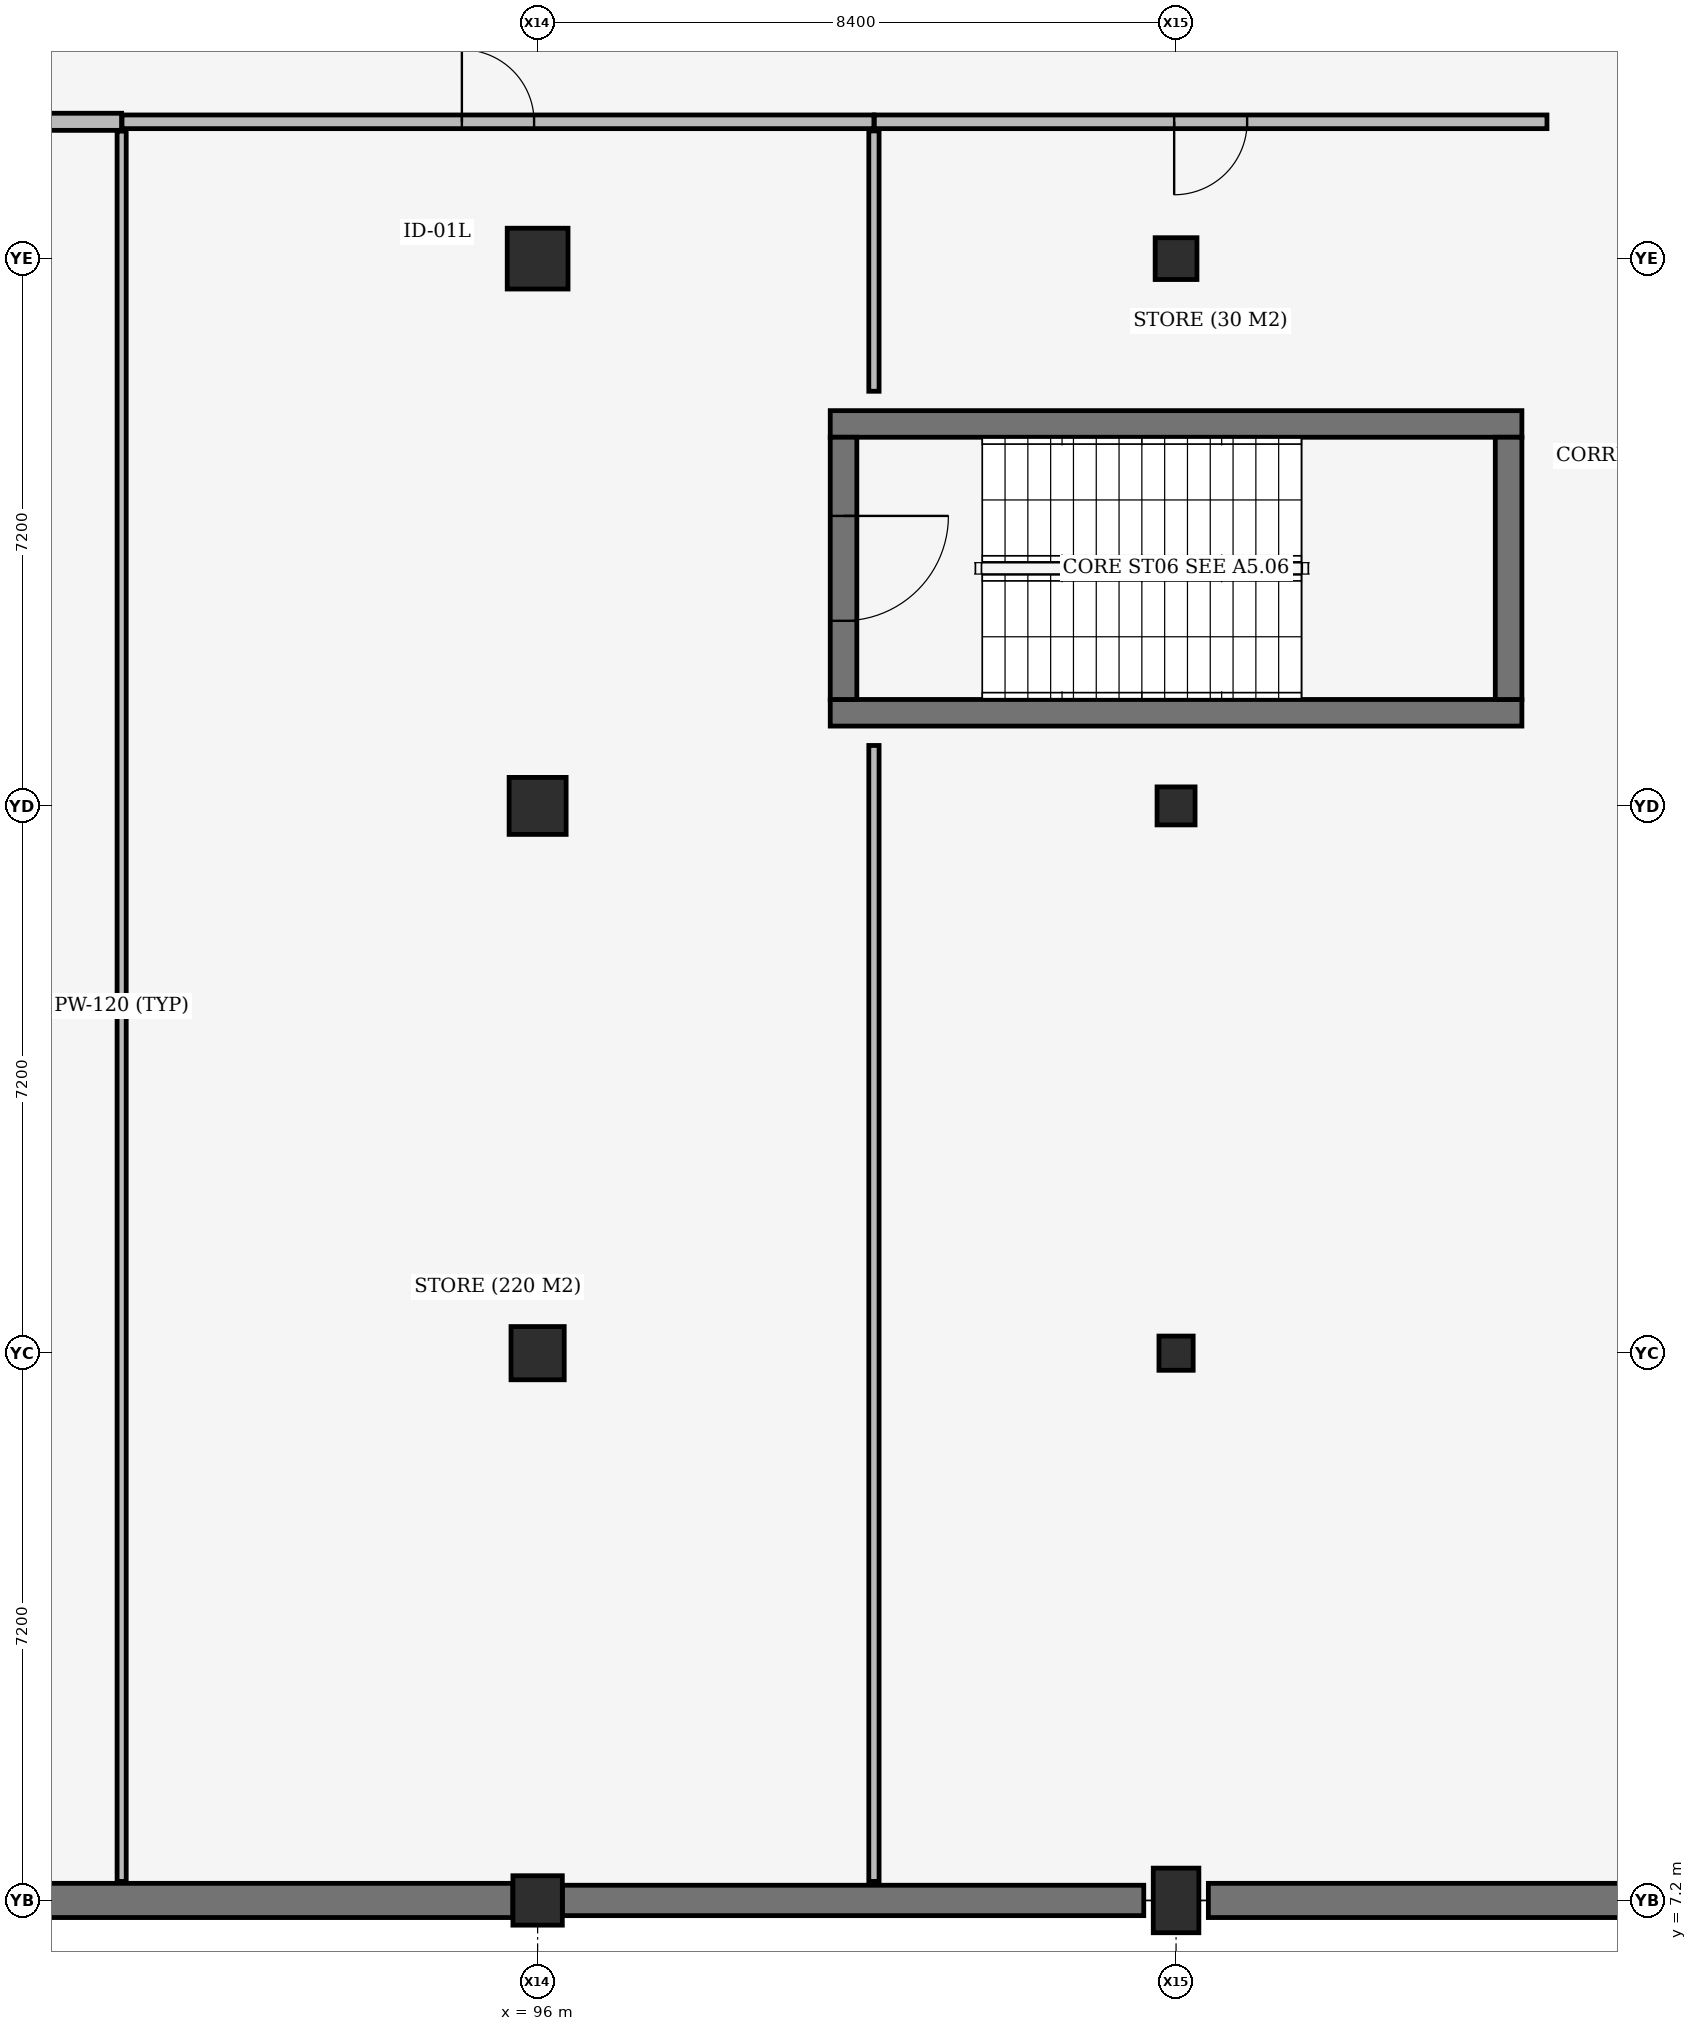
"""IFC4 building model, lengths in metres.
Left out: names, types, materials, properties, quantities, classifications, styles, units other than length and angle.
Written with IfcOpenShell. Run it as: python <this file> out.ifc"""

import sys

from ifc_helpers import new_model, si_unit, direction, frame, frame_2d, origin, origin_2d, place, context, subcontext, project, spatial, rectangle, extrude, element, fill, save


model = new_model("IFC4")
c1 = context("Model", 3, precision=1e-05, world=origin(), true_north=direction((0.0, 1.0)))
c2 = subcontext(c1, "Body", "Model", "MODEL_VIEW")
j1 = project(units=[si_unit("LENGTHUNIT", "METRE"), si_unit("PLANEANGLEUNIT", "RADIAN")], contexts=[c1])
p1 = place(None, origin())
s1 = spatial("IfcSite", under=j1, at=p1, CompositionType="ELEMENT")
p2 = place(p1, origin())
s2 = spatial("IfcBuilding", under=s1, at=p2, CompositionType="ELEMENT")
p3 = place(p2, frame((0.0, 0.0, -4.5)))
s3 = spatial("IfcBuildingStorey", under=s2, at=p3, CompositionType="ELEMENT", Elevation=-4.5)
p4 = place(p3, frame((96.0, 7.2, -0.42), z_axis=(0.0, 0.0, 1.0), x_axis=(1.0, 0.0, 0.0)))
e1 = element("IfcColumn", 1, at=p4, inside=s3, PredefinedType="COLUMN", context=c2, shape_type="SweptSolid", body=[
    extrude(rectangle(XDim=0.65, YDim=0.65, at=origin_2d()), origin(), (0.0, 0.0, 1.0), 4.6),
])
p5 = place(p3, frame((96.0, 14.4, -0.42), z_axis=(0.0, 0.0, 1.0), x_axis=(1.0, 0.0, 0.0)))
e2 = element("IfcColumn", 2, at=p5, inside=s3, PredefinedType="COLUMN", context=c2, shape_type="SweptSolid", body=[
    extrude(rectangle(XDim=0.7, YDim=0.7, at=origin_2d()), origin(), (0.0, 0.0, 1.0), 4.6),
])
p6 = place(p3, frame((96.0, 21.6, -0.42), z_axis=(0.0, 0.0, 1.0), x_axis=(1.0, 0.0, 0.0)))
e3 = element("IfcColumn", 3, at=p6, inside=s3, PredefinedType="COLUMN", context=c2, shape_type="SweptSolid", body=[
    extrude(rectangle(XDim=0.75, YDim=0.75, at=origin_2d()), origin(), (0.0, 0.0, 1.0), 4.6),
])
p7 = place(p3, frame((96.0, 28.8, -0.42), z_axis=(0.0, 0.0, 1.0), x_axis=(1.0, 0.0, 0.0)))
e4 = element("IfcColumn", 4, at=p7, inside=s3, PredefinedType="COLUMN", context=c2, shape_type="SweptSolid", body=[
    extrude(rectangle(XDim=0.8, YDim=0.8, at=origin_2d()), origin(), (0.0, 0.0, 1.0), 4.6),
])
p8 = place(p3, frame((104.4, 7.2, -0.42), z_axis=(0.0, 0.0, 1.0), x_axis=(1.0, 0.0, 0.0)))
e5 = element("IfcColumn", 5, at=p8, inside=s3, PredefinedType="COLUMN", context=c2, shape_type="SweptSolid", body=[
    extrude(rectangle(XDim=0.6, YDim=0.85, at=origin_2d()), origin(), (0.0, 0.0, 1.0), 4.6),
])
p9 = place(p3, frame((104.4, 14.4, -0.42), z_axis=(0.0, 0.0, 1.0), x_axis=(1.0, 0.0, 0.0)))
e6 = element("IfcColumn", 6, at=p9, inside=s3, PredefinedType="COLUMN", context=c2, shape_type="SweptSolid", body=[
    extrude(rectangle(XDim=0.45, YDim=0.45, at=origin_2d()), origin(), (0.0, 0.0, 1.0), 4.6),
])
p10 = place(p3, frame((104.4, 21.6, -0.42), z_axis=(0.0, 0.0, 1.0), x_axis=(1.0, 0.0, 0.0)))
e7 = element("IfcColumn", 7, at=p10, inside=s3, PredefinedType="COLUMN", context=c2, shape_type="SweptSolid", body=[
    extrude(rectangle(XDim=0.5, YDim=0.5, at=origin_2d()), origin(), (0.0, 0.0, 1.0), 4.6),
])
p11 = place(p3, frame((104.4, 28.8, -0.42), z_axis=(0.0, 0.0, 1.0), x_axis=(1.0, 0.0, 0.0)))
e8 = element("IfcColumn", 8, at=p11, inside=s3, PredefinedType="COLUMN", context=c2, shape_type="SweptSolid", body=[
    extrude(rectangle(XDim=0.55, YDim=0.55, at=origin_2d()), origin(), (0.0, 0.0, 1.0), 4.6),
])
for number, where, z_axis, x_axis in (
    (9, (99.85, 22.825, 0.0), (0.0, 0.0, 1.0), (1.0, 0.0, 0.0)),
    (10, (108.95, 26.625, 0.0), (0.0, 0.0, 1.0), (-1.0, 0.0, 0.0)),
):
    element("IfcWall", number, at=place(p3, frame(where, z_axis=z_axis, x_axis=x_axis)), inside=s3, PredefinedType="SHEAR", context=c2, shape_type="SweptSolid", body=[
        extrude(rectangle(XDim=9.1, YDim=0.35, at=frame_2d((4.55, 0.0))), origin(), (0.0, 0.0, 1.0), 4.18),
    ])
p12 = place(p3, frame((108.775, 23.0, 0.0), z_axis=(0.0, 0.0, 1.0), x_axis=(0.0, 1.0, 0.0)))
e11 = element("IfcWall", 11, at=p12, inside=s3, PredefinedType="SHEAR", context=c2, shape_type="SweptSolid", body=[
    extrude(rectangle(XDim=3.45, YDim=0.35, at=frame_2d((1.725, 0.0))), origin(), (0.0, 0.0, 1.0), 4.18),
])
p13 = place(p3, frame((88.025, 7.2, 0.0), z_axis=(0.0, 0.0, 1.0), x_axis=(1.0, 0.0, 0.0)))
e12 = element("IfcWall", 12, at=p13, inside=s3, PredefinedType="USERDEFINED", context=c2, shape_type="SweptSolid", body=[
    extrude(rectangle(XDim=7.65, YDim=0.45, at=frame_2d((3.825, 0.0))), origin(), (0.0, 0.0, 1.0), 4.18),
])
p14 = place(p3, frame((96.325, 7.2, 0.0), z_axis=(0.0, 0.0, 1.0), x_axis=(1.0, 0.0, 0.0)))
e13 = element("IfcWall", 13, at=p14, inside=s3, PredefinedType="USERDEFINED", context=c2, shape_type="SweptSolid", body=[
    extrude(rectangle(XDim=7.65, YDim=0.4, at=frame_2d((3.825, 0.0))), origin(), (0.0, 0.0, 1.0), 4.18),
])
p15 = place(p3, frame((104.825, 7.2, 0.0), z_axis=(0.0, 0.0, 1.0), x_axis=(1.0, 0.0, 0.0)))
e14 = element("IfcWall", 14, at=p15, inside=s3, PredefinedType="USERDEFINED", context=c2, shape_type="SweptSolid", body=[
    extrude(rectangle(XDim=7.65, YDim=0.45, at=frame_2d((3.825, 0.0))), origin(), (0.0, 0.0, 1.0), 4.18),
])
p16 = place(p3, frame((100.025, 26.45, 0.0), z_axis=(0.0, 0.0, 1.0), x_axis=(0.0, -1.0, 0.0)))
e15 = element("IfcWall", 15, at=p16, inside=s3, PredefinedType="SHEAR", context=c2, shape_type="SweptSolid", body=[
    extrude(rectangle(XDim=3.45, YDim=0.35, at=frame_2d((1.725, 0.0))), origin(), (0.0, 0.0, 1.0), 4.18),
])
p17 = place(p16, frame((1.035, 0.0, 0.0)))
e16 = element("IfcOpeningElement", 16, at=p17, cuts=e15, PredefinedType="OPENING", context=c2, shape_type="SweptSolid", body=[
    extrude(rectangle(XDim=1.38, YDim=2.2, at=frame_2d((0.69, 1.1))), frame((0.0, 0.185, 0.0), z_axis=(0.0, -1.0, 0.0), x_axis=(1.0, 0.0, 0.0)), (0.0, 0.0, 1.0), 0.37),
])
p18 = place(p3, frame((79.205, 30.6, 0.0), z_axis=(0.0, 0.0, 1.0), x_axis=(1.0, 0.0, 0.0)))
e17 = element("IfcWall", 17, at=p18, inside=s3, PredefinedType="STANDARD", context=c2, shape_type="SweptSolid", body=[
    extrude(rectangle(XDim=11.322, YDim=0.225, at=frame_2d((5.661, 0.0))), origin(), (0.0, 0.0, 1.0), 3.43),
])
p19 = place(p18, frame((4.836, 0.0, 0.0)))
e18 = element("IfcOpeningElement", 18, at=p19, cuts=e17, PredefinedType="OPENING", context=c2, shape_type="SweptSolid", body=[
    extrude(rectangle(XDim=1.65, YDim=2.25, at=frame_2d((0.825, 1.125))), frame((0.0, 0.123, 0.0), z_axis=(0.0, -1.0, 0.0), x_axis=(1.0, 0.0, 0.0)), (0.0, 0.0, 1.0), 0.245),
])
p20 = place(p3, frame((90.527, 7.45, 0.0), z_axis=(0.0, 0.0, 1.0), x_axis=(0.0, 1.0, 0.0)))
e19 = element("IfcWall", 19, at=p20, inside=s3, PredefinedType="PARTITIONING", context=c2, shape_type="SweptSolid", body=[
    extrude(rectangle(XDim=23.028, YDim=0.12, at=frame_2d((11.514, 0.0))), origin(), (0.0, 0.0, 1.0), 3.38),
])
p21 = place(p3, frame((90.532, 30.6, 0.0), z_axis=(0.0, 0.0, 1.0), x_axis=(1.0, 0.0, 0.0)))
e20 = element("IfcWall", 20, at=p21, inside=s3, PredefinedType="PARTITIONING", context=c2, shape_type="SweptSolid", body=[
    extrude(rectangle(XDim=9.893, YDim=0.18, at=frame_2d((4.947, 0.0))), origin(), (0.0, 0.0, 1.0), 3.53),
])
p22 = place(p21, frame((4.471, 0.0, 0.0)))
e21 = element("IfcOpeningElement", 21, at=p22, cuts=e20, PredefinedType="OPENING", context=c2, shape_type="SweptSolid", body=[
    extrude(rectangle(XDim=0.95, YDim=2.15, at=frame_2d((0.475, 1.075))), frame((0.0, 0.1, 0.0), z_axis=(0.0, -1.0, 0.0), x_axis=(1.0, 0.0, 0.0)), (0.0, 0.0, 1.0), 0.2),
])
p23 = place(p3, frame((100.425, 7.45, 0.0), z_axis=(0.0, 0.0, 1.0), x_axis=(0.0, 1.0, 0.0)))
e22 = element("IfcWall", 22, at=p23, inside=s3, PredefinedType="PARTITIONING", context=c2, shape_type="SweptSolid", body=[
    extrude(rectangle(XDim=14.945, YDim=0.135, at=frame_2d((7.473, 0.0))), origin(), (0.0, 0.0, 1.0), 3.43),
])
p24 = place(p3, frame((100.43, 30.6, 0.0), z_axis=(0.0, 0.0, 1.0), x_axis=(1.0, 0.0, 0.0)))
e23 = element("IfcWall", 23, at=p24, inside=s3, PredefinedType="PARTITIONING", context=c2, shape_type="SweptSolid", body=[
    extrude(rectangle(XDim=8.85, YDim=0.18, at=frame_2d((4.425, 0.0))), origin(), (0.0, 0.0, 1.0), 3.38),
])
p25 = place(p24, frame((3.945, 0.0, 0.0)))
e24 = element("IfcOpeningElement", 24, at=p25, cuts=e23, PredefinedType="OPENING", context=c2, shape_type="SweptSolid", body=[
    extrude(rectangle(XDim=0.96, YDim=2.15, at=frame_2d((0.48, 1.075))), frame((0.0, 0.1, 0.0), z_axis=(0.0, -1.0, 0.0), x_axis=(1.0, 0.0, 0.0)), (0.0, 0.0, 1.0), 0.2),
])
p26 = place(p3, frame((100.425, 27.055, 0.0), z_axis=(0.0, 0.0, 1.0), x_axis=(0.0, 1.0, 0.0)))
e25 = element("IfcWall", 25, at=p26, inside=s3, PredefinedType="PARTITIONING", context=c2, shape_type="SweptSolid", body=[
    extrude(rectangle(XDim=3.425, YDim=0.135, at=frame_2d((1.712, 0.0))), origin(), (0.0, 0.0, 1.0), 3.58),
])
p27 = place(p17, origin())
e26 = element("IfcDoor", 26, at=p27, inside=s3, OperationType="DOUBLE_DOOR_SINGLE_SWING", PredefinedType="DOOR", context=c2, shape_type="SweptSolid", body=[
    extrude(rectangle(XDim=1.38, YDim=2.2, at=frame_2d((0.69, 1.1))), frame((0.0, 0.025, 0.0), z_axis=(0.0, -1.0, 0.0), x_axis=(1.0, 0.0, 0.0)), (0.0, 0.0, 1.0), 0.05),
])
fill(e16, e26)
p28 = place(p22, origin())
e27 = element("IfcDoor", 27, at=p28, inside=s3, OperationType="SINGLE_SWING_LEFT", PredefinedType="DOOR", context=c2, shape_type="SweptSolid", body=[
    extrude(rectangle(XDim=0.95, YDim=2.15, at=frame_2d((0.475, 1.075))), frame((0.0, 0.025, 0.0), z_axis=(0.0, -1.0, 0.0), x_axis=(1.0, 0.0, 0.0)), (0.0, 0.0, 1.0), 0.05),
])
fill(e21, e27)
p29 = place(p25, origin())
e28 = element("IfcDoor", 28, at=p29, inside=s3, OperationType="SINGLE_SWING_RIGHT", PredefinedType="DOOR", context=c2, shape_type="SweptSolid", body=[
    extrude(rectangle(XDim=0.96, YDim=2.15, at=frame_2d((0.48, 1.075))), frame((0.0, 0.025, 0.0), z_axis=(0.0, -1.0, 0.0), x_axis=(1.0, 0.0, 0.0)), (0.0, 0.0, 1.0), 0.05),
])
fill(e24, e28)
save(model, sys.argv[1])
